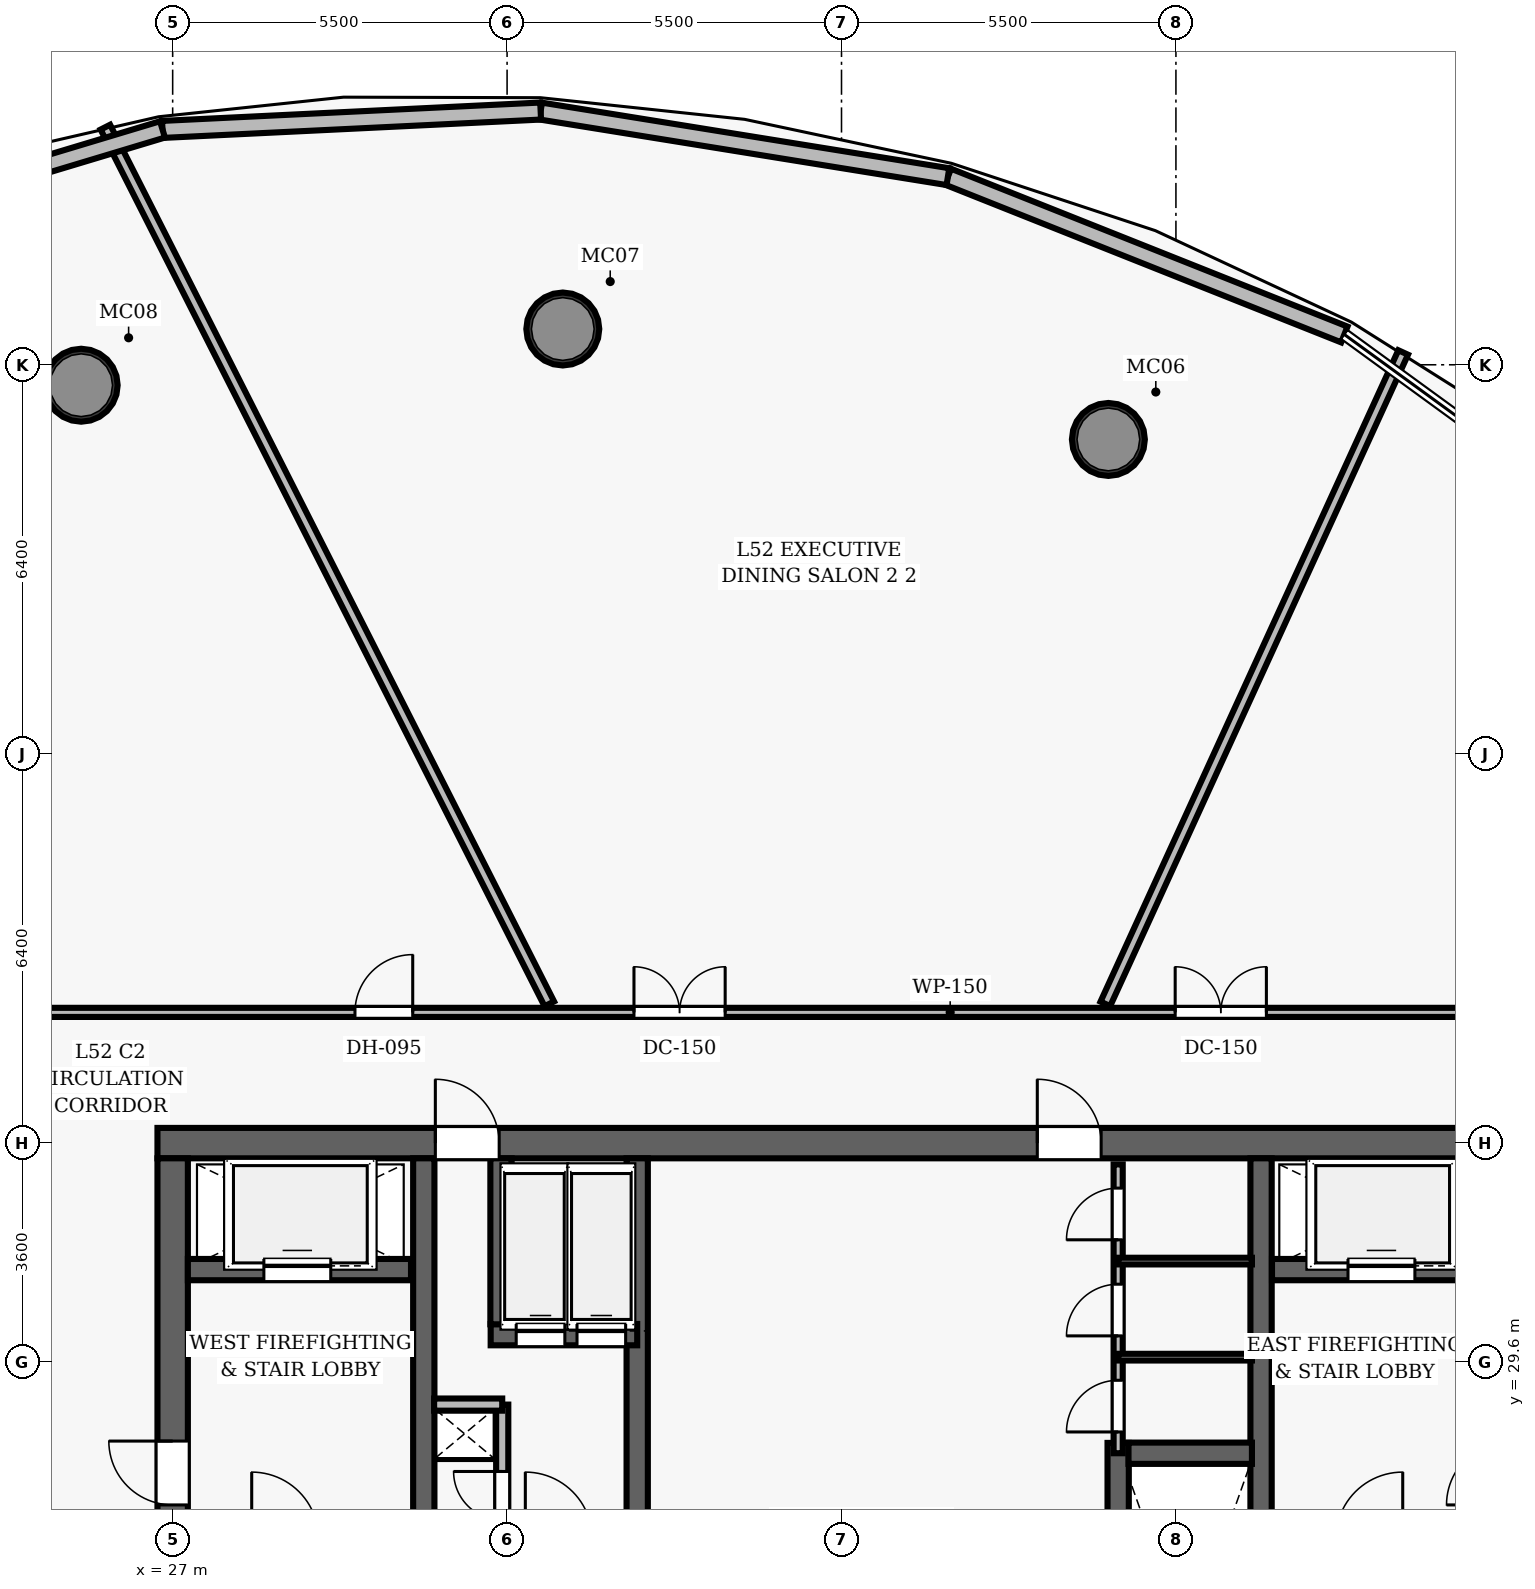
"""IFC4 building model, lengths in metres.
Left out: names, types, materials, properties, quantities, classifications, styles, units other than length and angle.
Written with IfcOpenShell. Run it as: python <this file> out.ifc"""

import sys

from ifc_helpers import new_model, si_unit, direction, frame, frame_2d, origin, origin_2d, place, context, subcontext, project, spatial, rectangle, hollow_circle, extrude, element, fill, save


model = new_model("IFC4")
c1 = context("Model", 3, precision=1e-05, world=origin(), true_north=direction((0.0, 1.0)))
c2 = subcontext(c1, "Body", "Model", "MODEL_VIEW")
j1 = project(units=[si_unit("LENGTHUNIT", "METRE"), si_unit("PLANEANGLEUNIT", "RADIAN")], contexts=[c1])
p1 = place(None, origin())
s1 = spatial("IfcSite", under=j1, at=p1, CompositionType="ELEMENT")
p2 = place(p1, origin())
s2 = spatial("IfcBuilding", under=s1, at=p2, CompositionType="ELEMENT")
p3 = place(p2, frame((0.0, 0.0, 205.85)))
s3 = spatial("IfcBuildingStorey", under=s2, at=p3, CompositionType="ELEMENT", Elevation=205.85)
p4 = place(p3, frame((26.75, 33.2, 0.0), z_axis=(0.0, 0.0, 1.0), x_axis=(1.0, 0.0, 0.0)))
e1 = element("IfcWall", 1, at=p4, inside=s3, PredefinedType="SHEAR", context=c2, shape_type="SweptSolid", body=[
    extrude(rectangle(XDim=22.5, YDim=0.5, at=frame_2d((11.25, 0.0))), origin(), (0.0, 0.0, 1.0), 3.85),
])
p5 = place(p4, frame((4.57, 0.0, 0.0)))
e2 = element("IfcOpeningElement", 2, at=p5, cuts=e1, PredefinedType="OPENING", context=c2, shape_type="SweptSolid", body=[
    extrude(rectangle(XDim=1.05, YDim=2.15, at=frame_2d((0.525, 1.075))), frame((0.0, 0.26, 0.0), z_axis=(0.0, -1.0, 0.0), x_axis=(1.0, 0.0, 0.0)), (0.0, 0.0, 1.0), 0.52),
])
p6 = place(p4, frame((14.47, 0.0, 0.0)))
e3 = element("IfcOpeningElement", 3, at=p6, cuts=e1, PredefinedType="OPENING", context=c2, shape_type="SweptSolid", body=[
    extrude(rectangle(XDim=1.05, YDim=2.15, at=frame_2d((0.525, 1.075))), frame((0.0, 0.26, 0.0), z_axis=(0.0, -1.0, 0.0), x_axis=(1.0, 0.0, 0.0)), (0.0, 0.0, 1.0), 0.52),
])
p7 = place(p3, frame((27.0, 19.05, 0.0), z_axis=(0.0, 0.0, 1.0), x_axis=(0.0, 1.0, 0.0)))
e4 = element("IfcWall", 4, at=p7, inside=s3, PredefinedType="SHEAR", context=c2, shape_type="SweptSolid", body=[
    extrude(rectangle(XDim=13.9, YDim=0.5, at=frame_2d((6.95, 0.0))), origin(), (0.0, 0.0, 1.0), 3.85),
])
p8 = place(p7, frame((8.2, 0.0, 0.0)))
e5 = element("IfcOpeningElement", 5, at=p8, cuts=e4, PredefinedType="OPENING", context=c2, shape_type="SweptSolid", body=[
    extrude(rectangle(XDim=1.05, YDim=2.15, at=frame_2d((0.525, 1.075))), frame((0.0, 0.26, 0.0), z_axis=(0.0, -1.0, 0.0), x_axis=(1.0, 0.0, 0.0)), (0.0, 0.0, 1.0), 0.52),
])
for number, where, z_axis, x_axis in (
    (6, (31.13, 19.05, 0.0), (0.0, 0.0, 1.0), (0.0, 1.0, 0.0)),
    (7, (44.9, 19.05, 0.0), (0.0, 0.0, 1.0), (0.0, 1.0, 0.0)),
):
    element("IfcWall", number, at=place(p3, frame(where, z_axis=z_axis, x_axis=x_axis)), inside=s3, PredefinedType="SHEAR", context=c2, shape_type="SweptSolid", body=[
        extrude(rectangle(XDim=13.9, YDim=0.35, at=frame_2d((6.95, 0.0))), origin(), (0.0, 0.0, 1.0), 3.85),
    ])
for number, where, z_axis, x_axis in (
    (8, (42.389, 44.772, 0.0), (0.0, 0.0, 1.0), (1.0, 0.0, 0.0)),
    (9, (33.416, 46.588, 0.0), (0.0, 0.0, 1.0), (1.0, 0.0, 0.0)),
    (10, (25.496, 45.664, 0.0), (0.0, 0.0, 1.0), (1.0, 0.0, 0.0)),
):
    element("IfcColumn", number, at=place(p3, frame(where, z_axis=z_axis, x_axis=x_axis)), inside=s3, PredefinedType="COLUMN", context=c2, shape_type="SweptSolid", body=[
        extrude(hollow_circle(Radius=0.6, WallThickness=0.05, at=origin_2d()), origin(), (0.0, 0.0, 1.0), 3.85),
    ])
p9 = place(p3, frame((27.25, 31.12, 0.0), z_axis=(0.0, 0.0, 1.0), x_axis=(1.0, 0.0, 0.0)))
e11 = element("IfcWall", 11, at=p9, inside=s3, PredefinedType="SHEAR", context=c2, shape_type="SweptSolid", body=[
    extrude(rectangle(XDim=3.67, YDim=0.35, at=frame_2d((1.835, 0.0))), origin(), (0.0, 0.0, 1.0), 3.035),
])
p10 = place(p9, frame((1.25, 0.0, 0.0)))
e12 = element("IfcOpeningElement", 12, at=p10, cuts=e11, PredefinedType="OPENING", context=c2, shape_type="SweptSolid", body=[
    extrude(rectangle(XDim=1.1, YDim=2.15, at=frame_2d((0.55, 1.075))), frame((0.0, 0.185, 0.0), z_axis=(0.0, -1.0, 0.0), x_axis=(1.0, 0.0, 0.0)), (0.0, 0.0, 1.0), 0.37),
])
p11 = place(p3, frame((45.08, 31.12, 0.0), z_axis=(0.0, 0.0, 1.0), x_axis=(1.0, 0.0, 0.0)))
e13 = element("IfcWall", 13, at=p11, inside=s3, PredefinedType="SHEAR", context=c2, shape_type="SweptSolid", body=[
    extrude(rectangle(XDim=3.67, YDim=0.35, at=frame_2d((1.835, 0.0))), origin(), (0.0, 0.0, 1.0), 3.035),
])
p12 = place(p11, frame((1.25, 0.0, 0.0)))
e14 = element("IfcOpeningElement", 14, at=p12, cuts=e13, PredefinedType="OPENING", context=c2, shape_type="SweptSolid", body=[
    extrude(rectangle(XDim=1.1, YDim=2.15, at=frame_2d((0.55, 1.075))), frame((0.0, 0.185, 0.0), z_axis=(0.0, -1.0, 0.0), x_axis=(1.0, 0.0, 0.0)), (0.0, 0.0, 1.0), 0.37),
])
p13 = place(p3, frame((34.64, 26.69, 0.0), z_axis=(0.0, 0.0, 1.0), x_axis=(0.0, 1.0, 0.0)))
e15 = element("IfcWall", 15, at=p13, inside=s3, PredefinedType="SHEAR", context=c2, shape_type="SweptSolid", body=[
    extrude(rectangle(XDim=6.26, YDim=0.35, at=frame_2d((3.13, 0.0))), origin(), (0.0, 0.0, 1.0), 3.85),
])
p14 = place(p3, frame((32.23, 30.05, 0.0), z_axis=(0.0, 0.0, 1.0), x_axis=(1.0, 0.0, 0.0)))
e16 = element("IfcWall", 16, at=p14, inside=s3, PredefinedType="SHEAR", context=c2, shape_type="SweptSolid", body=[
    extrude(rectangle(XDim=2.41, YDim=0.35, at=frame_2d((1.205, 0.0))), origin(), (0.0, 0.0, 1.0), 3.035),
])
p15 = place(p14, frame((0.42, 0.0, 0.0)))
e17 = element("IfcOpeningElement", 17, at=p15, cuts=e16, PredefinedType="OPENING", context=c2, shape_type="SweptSolid", body=[
    extrude(rectangle(XDim=0.8, YDim=2.15, at=frame_2d((0.4, 1.075))), frame((0.0, 0.185, 0.0), z_axis=(0.0, -1.0, 0.0), x_axis=(1.0, 0.0, 0.0)), (0.0, 0.0, 1.0), 0.37),
])
p16 = place(p14, frame((1.42, 0.0, 0.0)))
e18 = element("IfcOpeningElement", 18, at=p16, cuts=e16, PredefinedType="OPENING", context=c2, shape_type="SweptSolid", body=[
    extrude(rectangle(XDim=0.8, YDim=2.15, at=frame_2d((0.4, 1.075))), frame((0.0, 0.185, 0.0), z_axis=(0.0, -1.0, 0.0), x_axis=(1.0, 0.0, 0.0)), (0.0, 0.0, 1.0), 0.37),
])
p17 = place(p3, frame((32.4, 30.22, 0.0), z_axis=(0.0, 0.0, 1.0), x_axis=(0.0, 1.0, 0.0)))
e19 = element("IfcWall", 19, at=p17, inside=s3, PredefinedType="SHEAR", context=c2, shape_type="SweptSolid", body=[
    extrude(rectangle(XDim=2.73, YDim=0.35, at=frame_2d((1.365, 0.0))), origin(), (0.0, 0.0, 1.0), 3.035),
])
p18 = place(p3, frame((32.42, 26.86, 0.0), z_axis=(0.0, 0.0, 1.0), x_axis=(0.0, 1.0, 0.0)))
e20 = element("IfcWall", 20, at=p18, inside=s3, PredefinedType="PARTITIONING", context=c2, shape_type="SweptSolid", body=[
    extrude(rectangle(XDim=2.04, YDim=0.2, at=frame_2d((1.02, 0.0))), origin(), (0.0, 0.0, 1.0), 3.035),
])
p19 = place(p18, frame((0.14, 0.0, 0.0)))
e21 = element("IfcOpeningElement", 21, at=p19, cuts=e20, PredefinedType="OPENING", context=c2, shape_type="SweptSolid", body=[
    extrude(rectangle(XDim=0.8, YDim=2.05, at=frame_2d((0.4, 1.025))), frame((0.0, 0.11, 0.0), z_axis=(0.0, -1.0, 0.0), x_axis=(1.0, 0.0, 0.0)), (0.0, 0.0, 1.0), 0.22),
])
p20 = place(p3, frame((31.3, 28.9, 0.0), z_axis=(0.0, 0.0, 1.0), x_axis=(1.0, 0.0, 0.0)))
e22 = element("IfcWall", 22, at=p20, inside=s3, PredefinedType="PARTITIONING", context=c2, shape_type="SweptSolid", body=[
    extrude(rectangle(XDim=1.12, YDim=0.2, at=frame_2d((0.56, 0.0))), origin(), (0.0, 0.0, 1.0), 3.035),
])
p21 = place(p3, frame((42.55, 21.73, 0.0), z_axis=(0.0, 0.0, 1.0), x_axis=(0.0, 1.0, 0.0)))
e23 = element("IfcWall", 23, at=p21, inside=s3, PredefinedType="SHEAR", context=c2, shape_type="SweptSolid", body=[
    extrude(rectangle(XDim=6.54, YDim=0.35, at=frame_2d((3.27, 0.0))), origin(), (0.0, 0.0, 1.0), 3.035),
])
p22 = place(p3, frame((42.72, 28.1, 0.0), z_axis=(0.0, 0.0, 1.0), x_axis=(1.0, 0.0, 0.0)))
e24 = element("IfcWall", 24, at=p22, inside=s3, PredefinedType="SHEAR", context=c2, shape_type="SweptSolid", body=[
    extrude(rectangle(XDim=2.03, YDim=0.35, at=frame_2d((1.015, 0.0))), origin(), (0.0, 0.0, 1.0), 3.035),
])
p23 = place(p3, frame((42.55, 28.1, 0.0), z_axis=(0.0, 0.0, 1.0), x_axis=(0.0, 1.0, 0.0)))
e25 = element("IfcWall", 25, at=p23, inside=s3, PredefinedType="PARTITIONING", context=c2, shape_type="SweptSolid", body=[
    extrude(rectangle(XDim=4.75, YDim=0.15, at=frame_2d((2.375, 0.0))), origin(), (0.0, 0.0, 1.0), 3.035),
])
p24 = place(p23, frame((0.35, 0.0, 0.0)))
e26 = element("IfcOpeningElement", 26, at=p24, cuts=e25, PredefinedType="OPENING", context=c2, shape_type="SweptSolid", body=[
    extrude(rectangle(XDim=0.85, YDim=2.1, at=frame_2d((0.425, 1.05))), frame((0.0, 0.085, 0.0), z_axis=(0.0, -1.0, 0.0), x_axis=(1.0, 0.0, 0.0)), (0.0, 0.0, 1.0), 0.17),
])
p25 = place(p23, frame((1.93, 0.0, 0.0)))
e27 = element("IfcOpeningElement", 27, at=p25, cuts=e25, PredefinedType="OPENING", context=c2, shape_type="SweptSolid", body=[
    extrude(rectangle(XDim=0.85, YDim=2.1, at=frame_2d((0.425, 1.05))), frame((0.0, 0.085, 0.0), z_axis=(0.0, -1.0, 0.0), x_axis=(1.0, 0.0, 0.0)), (0.0, 0.0, 1.0), 0.17),
])
p26 = place(p23, frame((3.51, 0.0, 0.0)))
e28 = element("IfcOpeningElement", 28, at=p26, cuts=e25, PredefinedType="OPENING", context=c2, shape_type="SweptSolid", body=[
    extrude(rectangle(XDim=0.85, YDim=2.1, at=frame_2d((0.425, 1.05))), frame((0.0, 0.085, 0.0), z_axis=(0.0, -1.0, 0.0), x_axis=(1.0, 0.0, 0.0)), (0.0, 0.0, 1.0), 0.17),
])
for number, where, z_axis, x_axis in (
    (29, (42.55, 29.68, 0.0), (0.0, 0.0, 1.0), (1.0, 0.0, 0.0)),
    (30, (42.55, 31.26, 0.0), (0.0, 0.0, 1.0), (1.0, 0.0, 0.0)),
):
    element("IfcWall", number, at=place(p3, frame(where, z_axis=z_axis, x_axis=x_axis)), inside=s3, PredefinedType="PARTITIONING", context=c2, shape_type="SweptSolid", body=[
        extrude(rectangle(XDim=2.2, YDim=0.11, at=frame_2d((1.1, 0.0))), origin(), (0.0, 0.0, 1.0), 3.035),
    ])
p27 = place(p3, frame((24.85, 35.35, 0.0), z_axis=(0.0, 0.0, 1.0), x_axis=(1.0, 0.0, 0.0)))
e31 = element("IfcWall", 31, at=p27, inside=s3, PredefinedType="PARTITIONING", context=c2, shape_type="SweptSolid", body=[
    extrude(rectangle(XDim=26.0, YDim=0.15, at=frame_2d((13.0, 0.0))), origin(), (0.0, 0.0, 1.0), 3.035),
])
p28 = place(p27, frame((18.638, 0.0, 0.0)))
e32 = element("IfcOpeningElement", 32, at=p28, cuts=e31, PredefinedType="OPENING", context=c2, shape_type="SweptSolid", body=[
    extrude(rectangle(XDim=1.5, YDim=2.2, at=frame_2d((0.75, 1.1))), frame((0.0, 0.085, 0.0), z_axis=(0.0, -1.0, 0.0), x_axis=(1.0, 0.0, 0.0)), (0.0, 0.0, 1.0), 0.17),
])
p29 = place(p27, frame((9.737, 0.0, 0.0)))
e33 = element("IfcOpeningElement", 33, at=p29, cuts=e31, PredefinedType="OPENING", context=c2, shape_type="SweptSolid", body=[
    extrude(rectangle(XDim=1.5, YDim=2.2, at=frame_2d((0.75, 1.1))), frame((0.0, 0.085, 0.0), z_axis=(0.0, -1.0, 0.0), x_axis=(1.0, 0.0, 0.0)), (0.0, 0.0, 1.0), 0.17),
])
p30 = place(p27, frame((5.148, 0.0, 0.0)))
e34 = element("IfcOpeningElement", 34, at=p30, cuts=e31, PredefinedType="OPENING", context=c2, shape_type="SweptSolid", body=[
    extrude(rectangle(XDim=0.95, YDim=2.15, at=frame_2d((0.475, 1.075))), frame((0.0, 0.085, 0.0), z_axis=(0.0, -1.0, 0.0), x_axis=(1.0, 0.0, 0.0)), (0.0, 0.0, 1.0), 0.17),
])
p31 = place(p3, frame((42.339, 35.49, 0.0), z_axis=(0.0, 0.0, 1.0), x_axis=(0.415828822924, 0.909442900916, 0.0)))
e35 = element("IfcWall", 35, at=p31, inside=s3, PredefinedType="PARTITIONING", context=c2, shape_type="SweptSolid", body=[
    extrude(rectangle(XDim=11.779, YDim=0.175, at=frame_2d((5.89, 0.0))), origin(), (0.0, 0.0, 1.0), 3.035),
])
p32 = place(p3, frame((33.194, 35.49, 0.0), z_axis=(0.0, 0.0, 1.0), x_axis=(-0.451770043308, 0.89213442259, 0.0)))
e36 = element("IfcWall", 36, at=p32, inside=s3, PredefinedType="PARTITIONING", context=c2, shape_type="SweptSolid", body=[
    extrude(rectangle(XDim=16.161, YDim=0.175, at=frame_2d((8.081, 0.0))), origin(), (0.0, 0.0, 1.0), 3.035),
])
p33 = place(p3, frame((39.75, 49.094, 0.0), z_axis=(0.0, 0.0, 1.0), x_axis=(0.929068117102, -0.369908683035, 0.0)))
e37 = element("IfcWall", 37, at=p33, inside=s3, PredefinedType="SOLIDWALL", context=c2, shape_type="SweptSolid", body=[
    extrude(rectangle(XDim=7.018, YDim=0.28, at=frame_2d((3.509, 0.0))), origin(), (0.0, 0.0, 1.0), 3.62),
])
p34 = place(p3, frame((33.052, 50.173, 0.0), z_axis=(0.0, 0.0, 1.0), x_axis=(0.987281599143, -0.158981269318, 0.0)))
e38 = element("IfcWall", 38, at=p34, inside=s3, PredefinedType="SOLIDWALL", context=c2, shape_type="SweptSolid", body=[
    extrude(rectangle(XDim=6.784, YDim=0.28, at=frame_2d((3.392, 0.0))), origin(), (0.0, 0.0, 1.0), 3.62),
])
p35 = place(p3, frame((26.833, 49.871, 0.0), z_axis=(0.0, 0.0, 1.0), x_axis=(0.998822985186, 0.048504064408, 0.0)))
e39 = element("IfcWall", 39, at=p35, inside=s3, PredefinedType="SOLIDWALL", context=c2, shape_type="SweptSolid", body=[
    extrude(rectangle(XDim=6.226, YDim=0.28, at=frame_2d((3.113, 0.0))), origin(), (0.0, 0.0, 1.0), 3.62),
])
p36 = place(p3, frame((21.6, 48.296, 0.0), z_axis=(0.0, 0.0, 1.0), x_axis=(0.957591096502, 0.288130685454, 0.0)))
e40 = element("IfcWall", 40, at=p36, inside=s3, PredefinedType="SOLIDWALL", context=c2, shape_type="SweptSolid", body=[
    extrude(rectangle(XDim=5.464, YDim=0.28, at=frame_2d((2.732, 0.0))), origin(), (0.0, 0.0, 1.0), 3.62),
])
p37 = place(p8, origin())
e41 = element("IfcDoor", 41, at=p37, inside=s3, OperationType="SINGLE_SWING_RIGHT", PredefinedType="DOOR", context=c2, shape_type="SweptSolid", body=[
    extrude(rectangle(XDim=1.05, YDim=2.15, at=frame_2d((0.525, 1.075))), frame((0.0, 0.025, 0.0), z_axis=(0.0, -1.0, 0.0), x_axis=(1.0, 0.0, 0.0)), (0.0, 0.0, 1.0), 0.05),
])
fill(e5, e41)
p38 = place(p19, origin())
e42 = element("IfcDoor", 42, at=p38, inside=s3, OperationType="SINGLE_SWING_RIGHT", PredefinedType="DOOR", context=c2, shape_type="SweptSolid", body=[
    extrude(rectangle(XDim=0.8, YDim=2.05, at=frame_2d((0.4, 1.025))), frame((0.0, 0.025, 0.0), z_axis=(0.0, -1.0, 0.0), x_axis=(1.0, 0.0, 0.0)), (0.0, 0.0, 1.0), 0.05),
])
fill(e21, e42)
p39 = place(p5, origin())
e43 = element("IfcDoor", 43, at=p39, inside=s3, OperationType="SINGLE_SWING_LEFT", PredefinedType="DOOR", context=c2, shape_type="SweptSolid", body=[
    extrude(rectangle(XDim=1.05, YDim=2.15, at=frame_2d((0.525, 1.075))), frame((0.0, 0.025, 0.0), z_axis=(0.0, -1.0, 0.0), x_axis=(1.0, 0.0, 0.0)), (0.0, 0.0, 1.0), 0.05),
])
fill(e2, e43)
p40 = place(p6, origin())
e44 = element("IfcDoor", 44, at=p40, inside=s3, OperationType="SINGLE_SWING_LEFT", PredefinedType="DOOR", context=c2, shape_type="SweptSolid", body=[
    extrude(rectangle(XDim=1.05, YDim=2.15, at=frame_2d((0.525, 1.075))), frame((0.0, 0.025, 0.0), z_axis=(0.0, -1.0, 0.0), x_axis=(1.0, 0.0, 0.0)), (0.0, 0.0, 1.0), 0.05),
])
fill(e3, e44)
p41 = place(p24, origin())
e45 = element("IfcDoor", 45, at=p41, inside=s3, OperationType="SINGLE_SWING_LEFT", PredefinedType="DOOR", context=c2, shape_type="SweptSolid", body=[
    extrude(rectangle(XDim=0.85, YDim=2.1, at=frame_2d((0.425, 1.05))), frame((0.0, 0.025, 0.0), z_axis=(0.0, -1.0, 0.0), x_axis=(1.0, 0.0, 0.0)), (0.0, 0.0, 1.0), 0.05),
])
fill(e26, e45)
p42 = place(p25, origin())
e46 = element("IfcDoor", 46, at=p42, inside=s3, OperationType="SINGLE_SWING_LEFT", PredefinedType="DOOR", context=c2, shape_type="SweptSolid", body=[
    extrude(rectangle(XDim=0.85, YDim=2.1, at=frame_2d((0.425, 1.05))), frame((0.0, 0.025, 0.0), z_axis=(0.0, -1.0, 0.0), x_axis=(1.0, 0.0, 0.0)), (0.0, 0.0, 1.0), 0.05),
])
fill(e27, e46)
p43 = place(p26, origin())
e47 = element("IfcDoor", 47, at=p43, inside=s3, OperationType="SINGLE_SWING_LEFT", PredefinedType="DOOR", context=c2, shape_type="SweptSolid", body=[
    extrude(rectangle(XDim=0.85, YDim=2.1, at=frame_2d((0.425, 1.05))), frame((0.0, 0.025, 0.0), z_axis=(0.0, -1.0, 0.0), x_axis=(1.0, 0.0, 0.0)), (0.0, 0.0, 1.0), 0.05),
])
fill(e28, e47)
p44 = place(p28, origin())
e48 = element("IfcDoor", 48, at=p44, inside=s3, OperationType="DOUBLE_DOOR_SINGLE_SWING", PredefinedType="DOOR", context=c2, shape_type="SweptSolid", body=[
    extrude(rectangle(XDim=1.5, YDim=2.2, at=frame_2d((0.75, 1.1))), frame((0.0, 0.025, 0.0), z_axis=(0.0, -1.0, 0.0), x_axis=(1.0, 0.0, 0.0)), (0.0, 0.0, 1.0), 0.05),
])
fill(e32, e48)
p45 = place(p29, origin())
e49 = element("IfcDoor", 49, at=p45, inside=s3, OperationType="DOUBLE_DOOR_SINGLE_SWING", PredefinedType="DOOR", context=c2, shape_type="SweptSolid", body=[
    extrude(rectangle(XDim=1.5, YDim=2.2, at=frame_2d((0.75, 1.1))), frame((0.0, 0.025, 0.0), z_axis=(0.0, -1.0, 0.0), x_axis=(1.0, 0.0, 0.0)), (0.0, 0.0, 1.0), 0.05),
])
fill(e33, e49)
p46 = place(p30, origin())
e50 = element("IfcDoor", 50, at=p46, inside=s3, OperationType="SINGLE_SWING_RIGHT", PredefinedType="DOOR", context=c2, shape_type="SweptSolid", body=[
    extrude(rectangle(XDim=0.95, YDim=2.15, at=frame_2d((0.475, 1.075))), frame((0.0, 0.025, 0.0), z_axis=(0.0, -1.0, 0.0), x_axis=(1.0, 0.0, 0.0)), (0.0, 0.0, 1.0), 0.05),
])
fill(e34, e50)
p47 = place(p10, origin())
e51 = element("IfcDoor", 51, at=p47, inside=s3, OperationType="SLIDING_TO_LEFT", PredefinedType="DOOR", context=c2, shape_type="SweptSolid", body=[
    extrude(rectangle(XDim=1.1, YDim=2.15, at=frame_2d((0.55, 1.075))), frame((0.0, 0.025, 0.0), z_axis=(0.0, -1.0, 0.0), x_axis=(1.0, 0.0, 0.0)), (0.0, 0.0, 1.0), 0.05),
])
fill(e12, e51)
p48 = place(p12, origin())
e52 = element("IfcDoor", 52, at=p48, inside=s3, OperationType="SLIDING_TO_LEFT", PredefinedType="DOOR", context=c2, shape_type="SweptSolid", body=[
    extrude(rectangle(XDim=1.1, YDim=2.15, at=frame_2d((0.55, 1.075))), frame((0.0, 0.025, 0.0), z_axis=(0.0, -1.0, 0.0), x_axis=(1.0, 0.0, 0.0)), (0.0, 0.0, 1.0), 0.05),
])
fill(e14, e52)
p49 = place(p15, origin())
e53 = element("IfcDoor", 53, at=p49, inside=s3, OperationType="SLIDING_TO_LEFT", PredefinedType="DOOR", context=c2, shape_type="SweptSolid", body=[
    extrude(rectangle(XDim=0.8, YDim=2.15, at=frame_2d((0.4, 1.075))), frame((0.0, 0.025, 0.0), z_axis=(0.0, -1.0, 0.0), x_axis=(1.0, 0.0, 0.0)), (0.0, 0.0, 1.0), 0.05),
])
fill(e17, e53)
p50 = place(p16, origin())
e54 = element("IfcDoor", 54, at=p50, inside=s3, OperationType="SLIDING_TO_LEFT", PredefinedType="DOOR", context=c2, shape_type="SweptSolid", body=[
    extrude(rectangle(XDim=0.8, YDim=2.15, at=frame_2d((0.4, 1.075))), frame((0.0, 0.025, 0.0), z_axis=(0.0, -1.0, 0.0), x_axis=(1.0, 0.0, 0.0)), (0.0, 0.0, 1.0), 0.05),
])
fill(e18, e54)
save(model, sys.argv[1])
